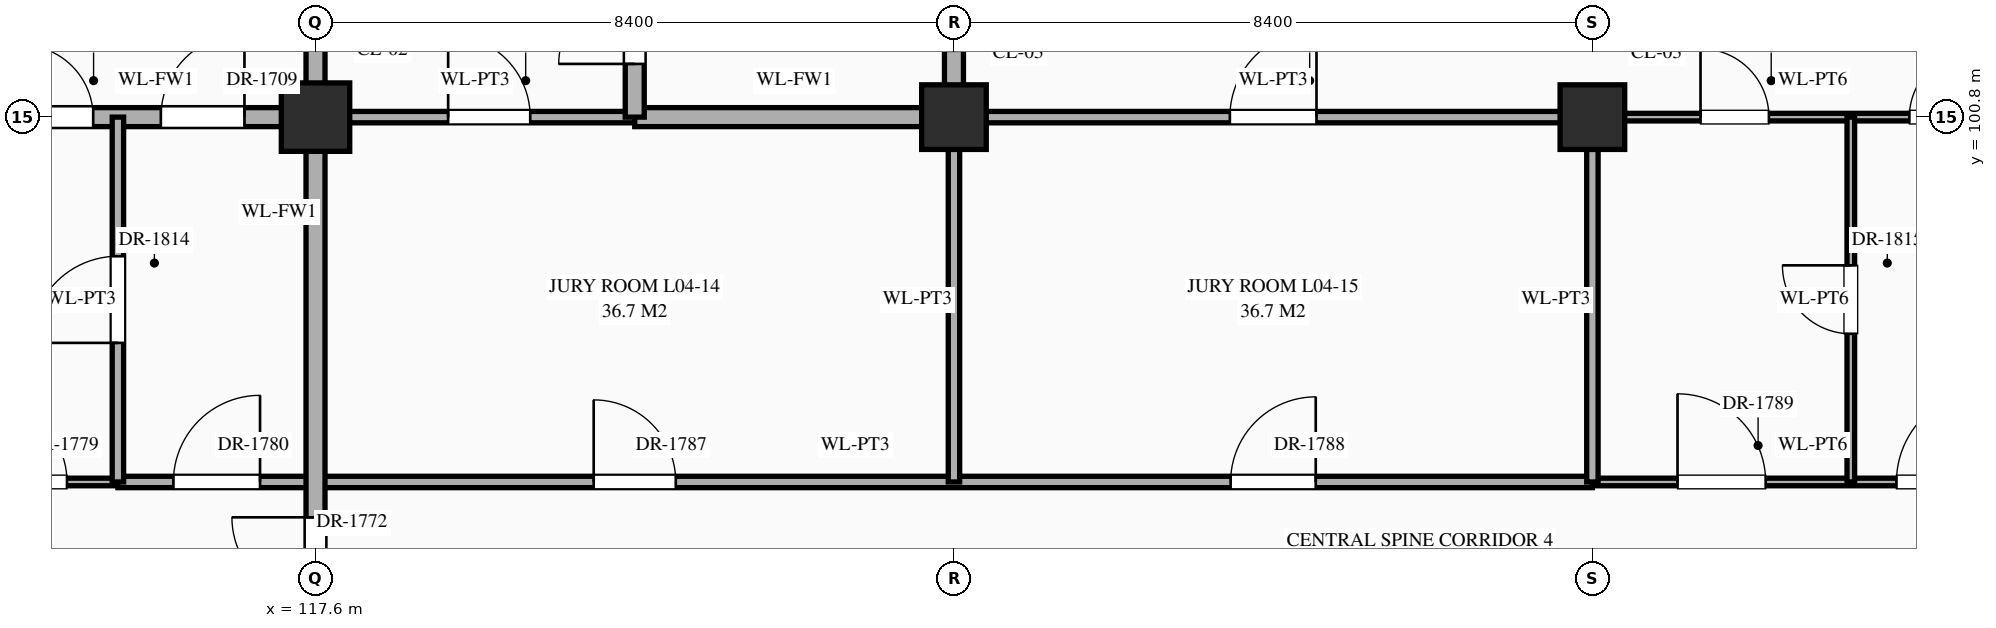
"""IFC4 building model, lengths in metres.
Left out: names, types, materials, properties, quantities, classifications, styles, units other than length and angle.
Written with IfcOpenShell. Run it as: python <this file> out.ifc"""

import sys

from ifc_helpers import new_model, si_unit, direction, frame, frame_2d, origin, origin_2d, place, context, subcontext, project, spatial, rectangle, extrude, element, fill, save


model = new_model("IFC4")
c1 = context("Model", 3, precision=1e-05, world=origin(), true_north=direction((0.0, 1.0)))
c2 = subcontext(c1, "Body", "Model", "MODEL_VIEW")
j1 = project(units=[si_unit("LENGTHUNIT", "METRE"), si_unit("PLANEANGLEUNIT", "RADIAN")], contexts=[c1])
p1 = place(None, origin())
s1 = spatial("IfcSite", under=j1, at=p1, CompositionType="ELEMENT")
p2 = place(p1, origin())
s2 = spatial("IfcBuilding", under=s1, at=p2, CompositionType="ELEMENT")
p3 = place(p2, frame((0.0, 0.0, 16.2)))
s3 = spatial("IfcBuildingStorey", under=s2, at=p3, CompositionType="ELEMENT", Elevation=16.2)
p4 = place(p3, frame((117.6, 100.8, 0.0), z_axis=(0.0, 0.0, 1.0), x_axis=(1.0, 0.0, 0.0)))
e1 = element("IfcColumn", 1, at=p4, inside=s3, PredefinedType="COLUMN", context=c2, shape_type="SweptSolid", body=[
    extrude(rectangle(XDim=0.9, YDim=0.9, at=origin_2d()), origin(), (0.0, 0.0, 1.0), 5.4),
])
for number, where, z_axis, x_axis in (
    (2, (126.0, 100.8, 0.0), (0.0, 0.0, 1.0), (1.0, 0.0, 0.0)),
    (3, (134.4, 100.8, 0.0), (0.0, 0.0, 1.0), (1.0, 0.0, 0.0)),
):
    element("IfcColumn", number, at=place(p3, frame(where, z_axis=z_axis, x_axis=x_axis)), inside=s3, PredefinedType="COLUMN", context=c2, shape_type="SweptSolid", body=[
        extrude(rectangle(XDim=0.85, YDim=0.85, at=origin_2d()), origin(), (0.0, 0.0, 1.0), 5.4),
    ])
p5 = place(p3, frame((109.2, 96.0, 0.0), z_axis=(0.0, 0.0, 1.0), x_axis=(1.0, 0.0, 0.0)))
e4 = element("IfcWall", 4, at=p5, inside=s3, PredefinedType="STANDARD", context=c2, shape_type="SweptSolid", body=[
    extrude(rectangle(XDim=5.8, YDim=0.1, at=frame_2d((2.9, 0.0))), origin(), (0.0, 0.0, 1.0), 5.12),
])
p6 = place(p5, frame((1.19, 0.0, 0.0)))
e5 = element("IfcOpeningElement", 5, at=p6, cuts=e4, PredefinedType="OPENING", context=c2, shape_type="SweptSolid", body=[
    extrude(rectangle(XDim=1.02, YDim=2.4, at=frame_2d((0.51, 1.2))), frame((0.0, 0.062, 0.0), z_axis=(0.0, -1.0, 0.0), x_axis=(1.0, 0.0, 0.0)), (0.0, 0.0, 1.0), 0.124),
])
p7 = place(p5, frame((4.07, 0.0, 0.0)))
e6 = element("IfcOpeningElement", 6, at=p7, cuts=e4, PredefinedType="OPENING", context=c2, shape_type="SweptSolid", body=[
    extrude(rectangle(XDim=1.06, YDim=2.4, at=frame_2d((0.53, 1.2))), frame((0.0, 0.062, 0.0), z_axis=(0.0, -1.0, 0.0), x_axis=(1.0, 0.0, 0.0)), (0.0, 0.0, 1.0), 0.124),
])
p8 = place(p3, frame((115.0, 96.0, 0.0), z_axis=(0.0, 0.0, 1.0), x_axis=(1.0, 0.0, 0.0)))
e7 = element("IfcWall", 7, at=p8, inside=s3, PredefinedType="STANDARD", context=c2, shape_type="SweptSolid", body=[
    extrude(rectangle(XDim=19.4, YDim=0.15, at=frame_2d((9.7, 0.0))), origin(), (0.0, 0.0, 1.0), 5.12),
])
p9 = place(p8, frame((0.73, 0.0, 0.0)))
e8 = element("IfcOpeningElement", 8, at=p9, cuts=e7, PredefinedType="OPENING", context=c2, shape_type="SweptSolid", body=[
    extrude(rectangle(XDim=1.14, YDim=2.4, at=frame_2d((0.57, 1.2))), frame((0.0, 0.087, 0.0), z_axis=(0.0, -1.0, 0.0), x_axis=(1.0, 0.0, 0.0)), (0.0, 0.0, 1.0), 0.174),
])
p10 = place(p8, frame((6.26, 0.0, 0.0)))
e9 = element("IfcOpeningElement", 9, at=p10, cuts=e7, PredefinedType="OPENING", context=c2, shape_type="SweptSolid", body=[
    extrude(rectangle(XDim=1.08, YDim=2.25, at=frame_2d((0.54, 1.125))), frame((0.0, 0.087, 0.0), z_axis=(0.0, -1.0, 0.0), x_axis=(1.0, 0.0, 0.0)), (0.0, 0.0, 1.0), 0.174),
])
p11 = place(p8, frame((14.64, 0.0, 0.0)))
e10 = element("IfcOpeningElement", 10, at=p11, cuts=e7, PredefinedType="OPENING", context=c2, shape_type="SweptSolid", body=[
    extrude(rectangle(XDim=1.12, YDim=2.25, at=frame_2d((0.56, 1.125))), frame((0.0, 0.087, 0.0), z_axis=(0.0, -1.0, 0.0), x_axis=(1.0, 0.0, 0.0)), (0.0, 0.0, 1.0), 0.174),
])
p12 = place(p3, frame((134.4, 96.0, 0.0), z_axis=(0.0, 0.0, 1.0), x_axis=(1.0, 0.0, 0.0)))
e11 = element("IfcWall", 11, at=p12, inside=s3, PredefinedType="STANDARD", context=c2, shape_type="SweptSolid", body=[
    extrude(rectangle(XDim=5.8, YDim=0.1, at=frame_2d((2.9, 0.0))), origin(), (0.0, 0.0, 1.0), 5.12),
])
p13 = place(p12, frame((1.12, 0.0, 0.0)))
e12 = element("IfcOpeningElement", 12, at=p13, cuts=e11, PredefinedType="OPENING", context=c2, shape_type="SweptSolid", body=[
    extrude(rectangle(XDim=1.16, YDim=2.3, at=frame_2d((0.58, 1.15))), frame((0.0, 0.062, 0.0), z_axis=(0.0, -1.0, 0.0), x_axis=(1.0, 0.0, 0.0)), (0.0, 0.0, 1.0), 0.124),
])
p14 = place(p12, frame((4.0, 0.0, 0.0)))
e13 = element("IfcOpeningElement", 13, at=p14, cuts=e11, PredefinedType="OPENING", context=c2, shape_type="SweptSolid", body=[
    extrude(rectangle(XDim=1.2, YDim=2.35, at=frame_2d((0.6, 1.175))), frame((0.0, 0.062, 0.0), z_axis=(0.0, -1.0, 0.0), x_axis=(1.0, 0.0, 0.0)), (0.0, 0.0, 1.0), 0.124),
])
p15 = place(p3, frame((113.4, 100.8, 0.0), z_axis=(0.0, 0.0, 1.0), x_axis=(1.0, 0.0, 0.0)))
e14 = element("IfcWall", 14, at=p15, inside=s3, PredefinedType="STANDARD", context=c2, shape_type="SweptSolid", body=[
    extrude(rectangle(XDim=4.2, YDim=0.25, at=frame_2d((2.1, 0.0))), origin(), (0.0, 0.0, 1.0), 4.27),
])
p16 = place(p15, frame((0.325, 0.0, 0.0)))
e15 = element("IfcOpeningElement", 15, at=p16, cuts=e14, PredefinedType="OPENING", context=c2, shape_type="SweptSolid", body=[
    extrude(rectangle(XDim=0.95, YDim=2.15, at=frame_2d((0.475, 1.075))), frame((0.0, 0.137, 0.0), z_axis=(0.0, -1.0, 0.0), x_axis=(1.0, 0.0, 0.0)), (0.0, 0.0, 1.0), 0.274),
])
p17 = place(p15, frame((2.165, 0.0, 0.0)))
e16 = element("IfcOpeningElement", 16, at=p17, cuts=e14, PredefinedType="OPENING", context=c2, shape_type="SweptSolid", body=[
    extrude(rectangle(XDim=1.1, YDim=2.2, at=frame_2d((0.55, 1.1))), frame((0.0, 0.137, 0.0), z_axis=(0.0, -1.0, 0.0), x_axis=(1.0, 0.0, 0.0)), (0.0, 0.0, 1.0), 0.274),
])
p18 = place(p3, frame((117.6, 100.8, 0.0), z_axis=(0.0, 0.0, 1.0), x_axis=(1.0, 0.0, 0.0)))
e17 = element("IfcWall", 17, at=p18, inside=s3, PredefinedType="STANDARD", context=c2, shape_type="SweptSolid", body=[
    extrude(rectangle(XDim=4.2, YDim=0.15, at=frame_2d((2.1, 0.0))), origin(), (0.0, 0.0, 1.0), 4.27),
])
p19 = place(p18, frame((1.745, 0.0, 0.0)))
e18 = element("IfcOpeningElement", 18, at=p19, cuts=e17, PredefinedType="OPENING", context=c2, shape_type="SweptSolid", body=[
    extrude(rectangle(XDim=1.08, YDim=2.25, at=frame_2d((0.54, 1.125))), frame((0.0, 0.087, 0.0), z_axis=(0.0, -1.0, 0.0), x_axis=(1.0, 0.0, 0.0)), (0.0, 0.0, 1.0), 0.174),
])
p20 = place(p3, frame((121.8, 100.8, 0.0), z_axis=(0.0, 0.0, 1.0), x_axis=(1.0, 0.0, 0.0)))
e19 = element("IfcWall", 19, at=p20, inside=s3, PredefinedType="STANDARD", context=c2, shape_type="SweptSolid", body=[
    extrude(rectangle(XDim=4.2, YDim=0.25, at=frame_2d((2.1, 0.0))), origin(), (0.0, 0.0, 1.0), 4.27),
])
p21 = place(p3, frame((126.0, 100.8, 0.0), z_axis=(0.0, 0.0, 1.0), x_axis=(1.0, 0.0, 0.0)))
e20 = element("IfcWall", 20, at=p21, inside=s3, PredefinedType="STANDARD", context=c2, shape_type="SweptSolid", body=[
    extrude(rectangle(XDim=8.4, YDim=0.15, at=frame_2d((4.2, 0.0))), origin(), (0.0, 0.0, 1.0), 4.27),
])
p22 = place(p21, frame((3.63, 0.0, 0.0)))
e21 = element("IfcOpeningElement", 21, at=p22, cuts=e20, PredefinedType="OPENING", context=c2, shape_type="SweptSolid", body=[
    extrude(rectangle(XDim=1.14, YDim=2.4, at=frame_2d((0.57, 1.2))), frame((0.0, 0.087, 0.0), z_axis=(0.0, -1.0, 0.0), x_axis=(1.0, 0.0, 0.0)), (0.0, 0.0, 1.0), 0.174),
])
p23 = place(p3, frame((134.4, 100.8, 0.0), z_axis=(0.0, 0.0, 1.0), x_axis=(1.0, 0.0, 0.0)))
e22 = element("IfcWall", 22, at=p23, inside=s3, PredefinedType="STANDARD", context=c2, shape_type="SweptSolid", body=[
    extrude(rectangle(XDim=5.8, YDim=0.1, at=frame_2d((2.9, 0.0))), origin(), (0.0, 0.0, 1.0), 4.27),
])
p24 = place(p23, frame((1.423, 0.0, 0.0)))
e23 = element("IfcOpeningElement", 23, at=p24, cuts=e22, PredefinedType="OPENING", context=c2, shape_type="SweptSolid", body=[
    extrude(rectangle(XDim=0.9, YDim=2.15, at=frame_2d((0.45, 1.075))), frame((0.0, 0.062, 0.0), z_axis=(0.0, -1.0, 0.0), x_axis=(1.0, 0.0, 0.0)), (0.0, 0.0, 1.0), 0.124),
])
p25 = place(p23, frame((4.17, 0.0, 0.0)))
e24 = element("IfcOpeningElement", 24, at=p25, cuts=e22, PredefinedType="OPENING", context=c2, shape_type="SweptSolid", body=[
    extrude(rectangle(XDim=0.86, YDim=2.1, at=frame_2d((0.43, 1.05))), frame((0.0, 0.062, 0.0), z_axis=(0.0, -1.0, 0.0), x_axis=(1.0, 0.0, 0.0)), (0.0, 0.0, 1.0), 0.124),
])
p26 = place(p3, frame((115.0, 96.0, 0.0), z_axis=(0.0, 0.0, 1.0), x_axis=(0.0, 1.0, 0.0)))
e25 = element("IfcWall", 25, at=p26, inside=s3, PredefinedType="STANDARD", context=c2, shape_type="SweptSolid", body=[
    extrude(rectangle(XDim=4.8, YDim=0.15, at=frame_2d((2.4, 0.0))), origin(), (0.0, 0.0, 1.0), 5.12),
])
p27 = place(p26, frame((1.83, 0.0, 0.0)))
e26 = element("IfcOpeningElement", 26, at=p27, cuts=e25, PredefinedType="OPENING", context=c2, shape_type="SweptSolid", body=[
    extrude(rectangle(XDim=1.14, YDim=2.4, at=frame_2d((0.57, 1.2))), frame((0.0, 0.087, 0.0), z_axis=(0.0, -1.0, 0.0), x_axis=(1.0, 0.0, 0.0)), (0.0, 0.0, 1.0), 0.174),
])
p28 = place(p3, frame((117.6, 91.2, 0.0), z_axis=(0.0, 0.0, 1.0), x_axis=(0.0, 1.0, 0.0)))
e27 = element("IfcWall", 27, at=p28, inside=s3, PredefinedType="STANDARD", context=c2, shape_type="SweptSolid", body=[
    extrude(rectangle(XDim=13.2, YDim=0.25, at=frame_2d((6.6, 0.0))), origin(), (0.0, 0.0, 1.0), 4.37),
])
p29 = place(p28, frame((0.465, 0.0, 0.0)))
e28 = element("IfcOpeningElement", 28, at=p29, cuts=e27, PredefinedType="OPENING", context=c2, shape_type="SweptSolid", body=[
    extrude(rectangle(XDim=1.1, YDim=2.2, at=frame_2d((0.55, 1.1))), frame((0.0, 0.137, 0.0), z_axis=(0.0, -1.0, 0.0), x_axis=(1.0, 0.0, 0.0)), (0.0, 0.0, 1.0), 0.274),
])
p30 = place(p28, frame((10.51, 0.0, 0.0)))
e29 = element("IfcOpeningElement", 29, at=p30, cuts=e27, PredefinedType="OPENING", context=c2, shape_type="SweptSolid", body=[
    extrude(rectangle(XDim=0.95, YDim=2.15, at=frame_2d((0.475, 1.075))), frame((0.0, 0.137, 0.0), z_axis=(0.0, -1.0, 0.0), x_axis=(1.0, 0.0, 0.0)), (0.0, 0.0, 1.0), 0.274),
])
p31 = place(p28, frame((3.235, 0.0, 0.0)))
e30 = element("IfcOpeningElement", 30, at=p31, cuts=e27, PredefinedType="OPENING", context=c2, shape_type="SweptSolid", body=[
    extrude(rectangle(XDim=1.1, YDim=2.2, at=frame_2d((0.55, 1.1))), frame((0.0, 0.137, 0.0), z_axis=(0.0, -1.0, 0.0), x_axis=(1.0, 0.0, 0.0)), (0.0, 0.0, 1.0), 0.274),
])
p32 = place(p3, frame((121.8, 100.8, 0.0), z_axis=(0.0, 0.0, 1.0), x_axis=(0.0, 1.0, 0.0)))
e31 = element("IfcWall", 31, at=p32, inside=s3, PredefinedType="STANDARD", context=c2, shape_type="SweptSolid", body=[
    extrude(rectangle(XDim=3.6, YDim=0.25, at=frame_2d((1.8, 0.0))), origin(), (0.0, 0.0, 1.0), 4.72),
])
p33 = place(p32, frame((0.7, 0.0, 0.0)))
e32 = element("IfcOpeningElement", 32, at=p33, cuts=e31, PredefinedType="OPENING", context=c2, shape_type="SweptSolid", body=[
    extrude(rectangle(XDim=1.0, YDim=2.2, at=frame_2d((0.5, 1.1))), frame((0.0, 0.137, 0.0), z_axis=(0.0, -1.0, 0.0), x_axis=(1.0, 0.0, 0.0)), (0.0, 0.0, 1.0), 0.274),
])
p34 = place(p3, frame((126.0, 96.0, 0.0), z_axis=(0.0, 0.0, 1.0), x_axis=(0.0, 1.0, 0.0)))
e33 = element("IfcWall", 33, at=p34, inside=s3, PredefinedType="STANDARD", context=c2, shape_type="SweptSolid", body=[
    extrude(rectangle(XDim=4.8, YDim=0.15, at=frame_2d((2.4, 0.0))), origin(), (0.0, 0.0, 1.0), 4.37),
])
p35 = place(p3, frame((126.0, 100.8, 0.0), z_axis=(0.0, 0.0, 1.0), x_axis=(0.0, 1.0, 0.0)))
e34 = element("IfcWall", 34, at=p35, inside=s3, PredefinedType="STANDARD", context=c2, shape_type="SweptSolid", body=[
    extrude(rectangle(XDim=3.6, YDim=0.25, at=frame_2d((1.8, 0.0))), origin(), (0.0, 0.0, 1.0), 4.37),
])
p36 = place(p35, frame((0.873, 0.0, 0.0)))
e35 = element("IfcOpeningElement", 35, at=p36, cuts=e34, PredefinedType="OPENING", context=c2, shape_type="SweptSolid", body=[
    extrude(rectangle(XDim=1.0, YDim=2.2, at=frame_2d((0.5, 1.1))), frame((0.0, 0.137, 0.0), z_axis=(0.0, -1.0, 0.0), x_axis=(1.0, 0.0, 0.0)), (0.0, 0.0, 1.0), 0.274),
])
p37 = place(p3, frame((134.4, 96.0, 0.0), z_axis=(0.0, 0.0, 1.0), x_axis=(0.0, 1.0, 0.0)))
e36 = element("IfcWall", 36, at=p37, inside=s3, PredefinedType="STANDARD", context=c2, shape_type="SweptSolid", body=[
    extrude(rectangle(XDim=4.8, YDim=0.15, at=frame_2d((2.4, 0.0))), origin(), (0.0, 0.0, 1.0), 4.37),
])
p38 = place(p3, frame((137.8, 96.0, 0.0), z_axis=(0.0, 0.0, 1.0), x_axis=(0.0, 1.0, 0.0)))
e37 = element("IfcWall", 37, at=p38, inside=s3, PredefinedType="STANDARD", context=c2, shape_type="SweptSolid", body=[
    extrude(rectangle(XDim=4.8, YDim=0.1, at=frame_2d((2.4, 0.0))), origin(), (0.0, 0.0, 1.0), 5.12),
])
p39 = place(p38, frame((1.95, 0.0, 0.0)))
e38 = element("IfcOpeningElement", 38, at=p39, cuts=e37, PredefinedType="OPENING", context=c2, shape_type="SweptSolid", body=[
    extrude(rectangle(XDim=0.9, YDim=2.15, at=frame_2d((0.45, 1.075))), frame((0.0, 0.062, 0.0), z_axis=(0.0, -1.0, 0.0), x_axis=(1.0, 0.0, 0.0)), (0.0, 0.0, 1.0), 0.124),
])
p40 = place(p33, origin())
e39 = element("IfcDoor", 39, at=p40, inside=s3, OperationType="SINGLE_SWING_LEFT", PredefinedType="DOOR", context=c2, shape_type="SweptSolid", body=[
    extrude(rectangle(XDim=1.0, YDim=2.2, at=frame_2d((0.5, 1.1))), frame((0.0, 0.025, 0.0), z_axis=(0.0, -1.0, 0.0), x_axis=(1.0, 0.0, 0.0)), (0.0, 0.0, 1.0), 0.05),
])
fill(e32, e39)
p41 = place(p19, origin())
e40 = element("IfcDoor", 40, at=p41, inside=s3, OperationType="SINGLE_SWING_LEFT", PredefinedType="DOOR", context=c2, shape_type="SweptSolid", body=[
    extrude(rectangle(XDim=1.08, YDim=2.25, at=frame_2d((0.54, 1.125))), frame((0.0, 0.025, 0.0), z_axis=(0.0, -1.0, 0.0), x_axis=(1.0, 0.0, 0.0)), (0.0, 0.0, 1.0), 0.05),
])
fill(e18, e40)
p42 = place(p16, origin())
e41 = element("IfcDoor", 41, at=p42, inside=s3, OperationType="SINGLE_SWING_LEFT", PredefinedType="DOOR", context=c2, shape_type="SweptSolid", body=[
    extrude(rectangle(XDim=0.95, YDim=2.15, at=frame_2d((0.475, 1.075))), frame((0.0, 0.025, 0.0), z_axis=(0.0, -1.0, 0.0), x_axis=(1.0, 0.0, 0.0)), (0.0, 0.0, 1.0), 0.05),
])
fill(e15, e41)
p43 = place(p17, origin())
e42 = element("IfcDoor", 42, at=p43, inside=s3, OperationType="SINGLE_SWING_RIGHT", PredefinedType="DOOR", context=c2, shape_type="SweptSolid", body=[
    extrude(rectangle(XDim=1.1, YDim=2.2, at=frame_2d((0.55, 1.1))), frame((0.0, 0.025, 0.0), z_axis=(0.0, -1.0, 0.0), x_axis=(1.0, 0.0, 0.0)), (0.0, 0.0, 1.0), 0.05),
])
fill(e16, e42)
p44 = place(p22, origin())
e43 = element("IfcDoor", 43, at=p44, inside=s3, OperationType="SINGLE_SWING_RIGHT", PredefinedType="DOOR", context=c2, shape_type="SweptSolid", body=[
    extrude(rectangle(XDim=1.14, YDim=2.4, at=frame_2d((0.57, 1.2))), frame((0.0, 0.025, 0.0), z_axis=(0.0, -1.0, 0.0), x_axis=(1.0, 0.0, 0.0)), (0.0, 0.0, 1.0), 0.05),
])
fill(e21, e43)
p45 = place(p24, origin())
e44 = element("IfcDoor", 44, at=p45, inside=s3, OperationType="SINGLE_SWING_LEFT", PredefinedType="DOOR", context=c2, shape_type="SweptSolid", body=[
    extrude(rectangle(XDim=0.9, YDim=2.15, at=frame_2d((0.45, 1.075))), frame((0.0, 0.025, 0.0), z_axis=(0.0, -1.0, 0.0), x_axis=(1.0, 0.0, 0.0)), (0.0, 0.0, 1.0), 0.05),
])
fill(e23, e44)
p46 = place(p25, origin())
e45 = element("IfcDoor", 45, at=p46, inside=s3, OperationType="SINGLE_SWING_RIGHT", PredefinedType="DOOR", context=c2, shape_type="SweptSolid", body=[
    extrude(rectangle(XDim=0.86, YDim=2.1, at=frame_2d((0.43, 1.05))), frame((0.0, 0.025, 0.0), z_axis=(0.0, -1.0, 0.0), x_axis=(1.0, 0.0, 0.0)), (0.0, 0.0, 1.0), 0.05),
])
fill(e24, e45)
p47 = place(p31, origin())
e46 = element("IfcDoor", 46, at=p47, inside=s3, OperationType="SINGLE_SWING_RIGHT", PredefinedType="DOOR", context=c2, shape_type="SweptSolid", body=[
    extrude(rectangle(XDim=1.1, YDim=2.2, at=frame_2d((0.55, 1.1))), frame((0.0, 0.025, 0.0), z_axis=(0.0, -1.0, 0.0), x_axis=(1.0, 0.0, 0.0)), (0.0, 0.0, 1.0), 0.05),
])
fill(e30, e46)
p48 = place(p7, origin())
e47 = element("IfcDoor", 47, at=p48, inside=s3, OperationType="SINGLE_SWING_LEFT", PredefinedType="DOOR", context=c2, shape_type="SweptSolid", body=[
    extrude(rectangle(XDim=1.06, YDim=2.4, at=frame_2d((0.53, 1.2))), frame((0.0, 0.025, 0.0), z_axis=(0.0, -1.0, 0.0), x_axis=(1.0, 0.0, 0.0)), (0.0, 0.0, 1.0), 0.05),
])
fill(e6, e47)
p49 = place(p9, origin())
e48 = element("IfcDoor", 48, at=p49, inside=s3, OperationType="SINGLE_SWING_RIGHT", PredefinedType="DOOR", context=c2, shape_type="SweptSolid", body=[
    extrude(rectangle(XDim=1.14, YDim=2.4, at=frame_2d((0.57, 1.2))), frame((0.0, 0.025, 0.0), z_axis=(0.0, -1.0, 0.0), x_axis=(1.0, 0.0, 0.0)), (0.0, 0.0, 1.0), 0.05),
])
fill(e8, e48)
p50 = place(p10, origin())
e49 = element("IfcDoor", 49, at=p50, inside=s3, OperationType="SINGLE_SWING_LEFT", PredefinedType="DOOR", context=c2, shape_type="SweptSolid", body=[
    extrude(rectangle(XDim=1.08, YDim=2.25, at=frame_2d((0.54, 1.125))), frame((0.0, 0.025, 0.0), z_axis=(0.0, -1.0, 0.0), x_axis=(1.0, 0.0, 0.0)), (0.0, 0.0, 1.0), 0.05),
])
fill(e9, e49)
p51 = place(p11, origin())
e50 = element("IfcDoor", 50, at=p51, inside=s3, OperationType="SINGLE_SWING_RIGHT", PredefinedType="DOOR", context=c2, shape_type="SweptSolid", body=[
    extrude(rectangle(XDim=1.12, YDim=2.25, at=frame_2d((0.56, 1.125))), frame((0.0, 0.025, 0.0), z_axis=(0.0, -1.0, 0.0), x_axis=(1.0, 0.0, 0.0)), (0.0, 0.0, 1.0), 0.05),
])
fill(e10, e50)
p52 = place(p13, origin())
e51 = element("IfcDoor", 51, at=p52, inside=s3, OperationType="SINGLE_SWING_LEFT", PredefinedType="DOOR", context=c2, shape_type="SweptSolid", body=[
    extrude(rectangle(XDim=1.16, YDim=2.3, at=frame_2d((0.58, 1.15))), frame((0.0, 0.025, 0.0), z_axis=(0.0, -1.0, 0.0), x_axis=(1.0, 0.0, 0.0)), (0.0, 0.0, 1.0), 0.05),
])
fill(e12, e51)
p53 = place(p14, origin())
e52 = element("IfcDoor", 52, at=p53, inside=s3, OperationType="SINGLE_SWING_RIGHT", PredefinedType="DOOR", context=c2, shape_type="SweptSolid", body=[
    extrude(rectangle(XDim=1.2, YDim=2.35, at=frame_2d((0.6, 1.175))), frame((0.0, 0.025, 0.0), z_axis=(0.0, -1.0, 0.0), x_axis=(1.0, 0.0, 0.0)), (0.0, 0.0, 1.0), 0.05),
])
fill(e13, e52)
p54 = place(p27, origin())
e53 = element("IfcDoor", 53, at=p54, inside=s3, OperationType="SINGLE_SWING_LEFT", PredefinedType="DOOR", context=c2, shape_type="SweptSolid", body=[
    extrude(rectangle(XDim=1.14, YDim=2.4, at=frame_2d((0.57, 1.2))), frame((0.0, 0.025, 0.0), z_axis=(0.0, -1.0, 0.0), x_axis=(1.0, 0.0, 0.0)), (0.0, 0.0, 1.0), 0.05),
])
fill(e26, e53)
p55 = place(p39, origin())
e54 = element("IfcDoor", 54, at=p55, inside=s3, OperationType="SINGLE_SWING_RIGHT", PredefinedType="DOOR", context=c2, shape_type="SweptSolid", body=[
    extrude(rectangle(XDim=0.9, YDim=2.15, at=frame_2d((0.45, 1.075))), frame((0.0, 0.025, 0.0), z_axis=(0.0, -1.0, 0.0), x_axis=(1.0, 0.0, 0.0)), (0.0, 0.0, 1.0), 0.05),
])
fill(e38, e54)
save(model, sys.argv[1])
